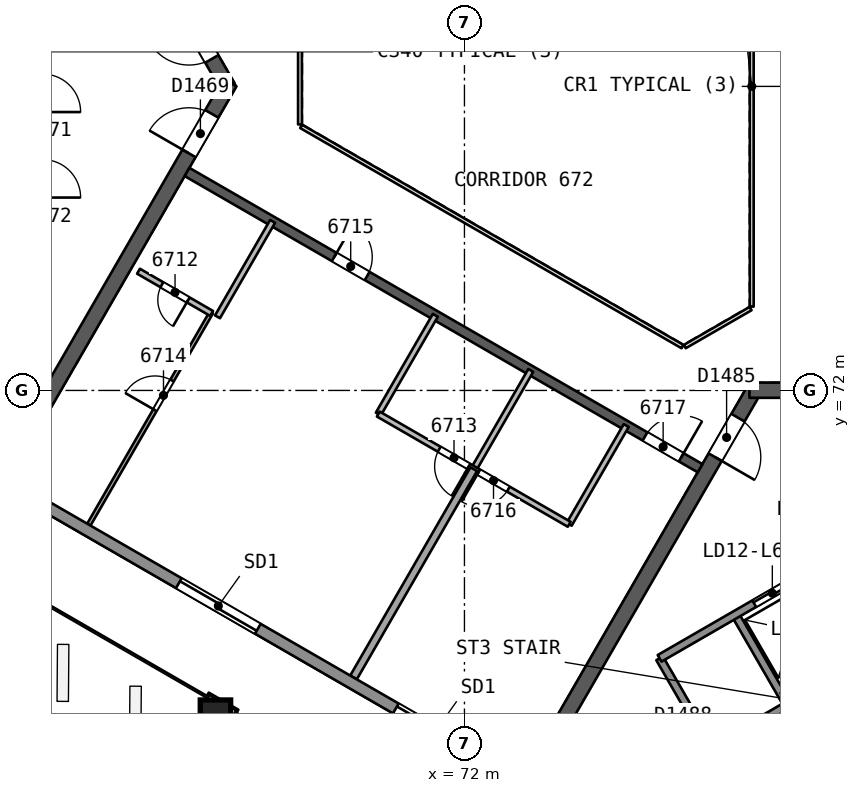
"""IFC4 building model, lengths in metres.
Left out: names, types, materials, properties, quantities, classifications, styles, units other than length and angle.
Written with IfcOpenShell. Run it as: python <this file> out.ifc"""

import sys

from ifc_helpers import new_model, si_unit, direction, frame, frame_2d, origin, origin_2d, place, context, subcontext, project, spatial, rectangle, extrude, element, fill, save


model = new_model("IFC4")
c1 = context("Model", 3, precision=1e-05, world=origin(), true_north=direction((0.0, 1.0)))
c2 = subcontext(c1, "Body", "Model", "MODEL_VIEW")
j1 = project(units=[si_unit("LENGTHUNIT", "METRE"), si_unit("PLANEANGLEUNIT", "RADIAN")], contexts=[c1])
p1 = place(None, origin())
s1 = spatial("IfcSite", under=j1, at=p1, CompositionType="ELEMENT")
p2 = place(p1, origin())
s2 = spatial("IfcBuilding", under=s1, at=p2, CompositionType="ELEMENT")
p3 = place(p2, frame((0.0, 0.0, 273.8)))
s3 = spatial("IfcBuildingStorey", under=s2, at=p3, CompositionType="ELEMENT", Elevation=273.8)
p4 = place(p3, frame((65.769, 80.0, 0.0), z_axis=(0.0, 0.0, 1.0), x_axis=(-0.50000177223, 0.866024380585, 0.0)))
e1 = element("IfcWall", 1, at=p4, inside=s3, PredefinedType="SHEAR", context=c2, shape_type="SweptSolid", body=[
    extrude(rectangle(XDim=10.265, YDim=0.4, at=frame_2d((5.132, 0.0))), origin(), (0.0, 0.0, 1.0), 3.7),
])
p5 = place(p4, frame((0.834, 0.0, 0.0)))
e2 = element("IfcOpeningElement", 2, at=p5, cuts=e1, PredefinedType="OPENING", context=c2, shape_type="SweptSolid", body=[
    extrude(rectangle(XDim=1.2, YDim=2.1, at=frame_2d((0.6, 1.05))), frame((0.0, 0.21, 0.0), z_axis=(0.0, -1.0, 0.0), x_axis=(1.0, 0.0, 0.0)), (0.0, 0.0, 1.0), 0.421),
])
p6 = place(p3, frame((60.737, 71.284, 0.0), z_axis=(0.0, 0.0, 1.0), x_axis=(0.50000547566, 0.866022242388, 0.0)))
e3 = element("IfcWall", 3, at=p6, inside=s3, PredefinedType="SHEAR", context=c2, shape_type="SweptSolid", body=[
    extrude(rectangle(XDim=10.18, YDim=0.4, at=frame_2d((5.09, 0.0))), origin(), (0.0, 0.0, 1.0), 3.7),
])
p7 = place(p6, frame((8.03, 0.0, 0.0)))
e4 = element("IfcOpeningElement", 4, at=p7, cuts=e3, PredefinedType="OPENING", context=c2, shape_type="SweptSolid", body=[
    extrude(rectangle(XDim=1.2, YDim=2.1, at=frame_2d((0.6, 1.05))), frame((0.0, 0.21, 0.0), z_axis=(0.0, -1.0, 0.0), x_axis=(1.0, 0.0, 0.0)), (0.0, 0.0, 1.0), 0.421),
])
p8 = place(p3, frame((79.615, 72.006, 0.0), z_axis=(0.0, 0.0, 1.0), x_axis=(-0.50000177223, -0.866024380585, 0.0)))
e5 = element("IfcWall", 5, at=p8, inside=s3, PredefinedType="SHEAR", context=c2, shape_type="SweptSolid", body=[
    extrude(rectangle(XDim=10.265, YDim=0.4, at=frame_2d((5.132, 0.0))), origin(), (0.0, 0.0, 1.0), 3.7),
])
p9 = place(p8, frame((0.834, 0.0, 0.0)))
e6 = element("IfcOpeningElement", 6, at=p9, cuts=e5, PredefinedType="OPENING", context=c2, shape_type="SweptSolid", body=[
    extrude(rectangle(XDim=1.2, YDim=2.1, at=frame_2d((0.6, 1.05))), frame((0.0, 0.21, 0.0), z_axis=(0.0, -1.0, 0.0), x_axis=(1.0, 0.0, 0.0)), (0.0, 0.0, 1.0), 0.421),
])
p10 = place(p3, frame((89.68, 72.006, 0.0), z_axis=(0.0, 0.0, 1.0), x_axis=(-1.0, 0.0, 0.0)))
e7 = element("IfcWall", 7, at=p10, inside=s3, PredefinedType="SHEAR", context=c2, shape_type="SweptSolid", body=[
    extrude(rectangle(XDim=10.18, YDim=0.4, at=frame_2d((5.09, 0.0))), origin(), (0.0, 0.0, 1.0), 3.7),
])
p11 = place(p10, frame((8.03, 0.0, 0.0)))
e8 = element("IfcOpeningElement", 8, at=p11, cuts=e7, PredefinedType="OPENING", context=c2, shape_type="SweptSolid", body=[
    extrude(rectangle(XDim=1.2, YDim=2.1, at=frame_2d((0.6, 1.05))), frame((0.0, 0.21, 0.0), z_axis=(0.0, -1.0, 0.0), x_axis=(1.0, 0.0, 0.0)), (0.0, 0.0, 1.0), 0.421),
])
p12 = place(p3, frame((64.7, 77.748, 0.0), z_axis=(0.0, 0.0, 1.0), x_axis=(0.866026492143, -0.499998114903, 0.0)))
e9 = element("IfcWall", 9, at=p12, inside=s3, PredefinedType="SHEAR", context=c2, shape_type="SweptSolid", body=[
    extrude(rectangle(XDim=15.588, YDim=0.25, at=frame_2d((7.794, 0.0))), origin(), (0.0, 0.0, 1.0), 3.3),
])
p13 = place(p12, frame((4.473, 0.0, 0.0)))
e10 = element("IfcOpeningElement", 10, at=p13, cuts=e9, PredefinedType="OPENING", context=c2, shape_type="SweptSolid", body=[
    extrude(rectangle(XDim=1.0, YDim=2.1, at=frame_2d((0.5, 1.05))), frame((0.0, 0.135, 0.0), z_axis=(0.0, -1.0, 0.0), x_axis=(1.0, 0.0, 0.0)), (0.0, 0.0, 1.0), 0.271),
])
p14 = place(p12, frame((13.917, 0.0, 0.0)))
e11 = element("IfcOpeningElement", 11, at=p14, cuts=e9, PredefinedType="OPENING", context=c2, shape_type="SweptSolid", body=[
    extrude(rectangle(XDim=1.1, YDim=2.1, at=frame_2d((0.55, 1.05))), frame((0.0, 0.135, 0.0), z_axis=(0.0, -1.0, 0.0), x_axis=(1.0, 0.0, 0.0)), (0.0, 0.0, 1.0), 0.271),
])
p15 = place(p3, frame((65.436, 63.435, 0.0), z_axis=(0.010093620709, 0.017482414954, 0.999796221231), x_axis=(-0.499907122366, -0.865843723195, 0.020187025824)))
e12 = element("IfcColumn", 12, at=p15, inside=s3, PredefinedType="COLUMN", context=c2, shape_type="SweptSolid", body=[
    extrude(rectangle(XDim=0.8, YDim=0.8, at=origin_2d()), origin(), (0.0, 0.0, 1.0), 3.701),
])
p16 = place(p3, frame((62.116, 68.469, 0.0), z_axis=(0.0, 0.0, 1.0), x_axis=(0.499987977232, 0.866032345022, 0.0)))
e13 = element("IfcWall", 13, at=p16, inside=s3, PredefinedType="PARTITIONING", context=c2, shape_type="SweptSolid", body=[
    extrude(rectangle(XDim=6.447, YDim=0.1, at=frame_2d((3.224, 0.0))), origin(), (0.0, 0.0, 1.0), 3.3),
])
p17 = place(p16, frame((3.478, 0.0, 0.0)))
e14 = element("IfcOpeningElement", 14, at=p17, cuts=e13, PredefinedType="OPENING", context=c2, shape_type="SweptSolid", body=[
    extrude(rectangle(XDim=0.9, YDim=2.1, at=frame_2d((0.45, 1.05))), frame((0.0, 0.061, 0.0), z_axis=(0.0, -1.0, 0.0), x_axis=(1.0, 0.0, 0.0)), (0.0, 0.0, 1.0), 0.121),
])
p18 = place(p3, frame((65.347, 74.026, 0.0), z_axis=(0.0, 0.0, 1.0), x_axis=(-0.866042797968, 0.49996987118, 0.0)))
e15 = element("IfcWall", 15, at=p18, inside=s3, PredefinedType="PARTITIONING", context=c2, shape_type="SweptSolid", body=[
    extrude(rectangle(XDim=2.221, YDim=0.15, at=frame_2d((1.11, 0.0))), origin(), (0.0, 0.0, 1.0), 3.3),
])
p19 = place(p18, frame((0.711, 0.0, 0.0)))
e16 = element("IfcOpeningElement", 16, at=p19, cuts=e15, PredefinedType="OPENING", context=c2, shape_type="SweptSolid", body=[
    extrude(rectangle(XDim=0.8, YDim=2.1, at=frame_2d((0.4, 1.05))), frame((0.0, 0.085, 0.0), z_axis=(0.0, -1.0, 0.0), x_axis=(1.0, 0.0, 0.0)), (0.0, 0.0, 1.0), 0.171),
])
p20 = place(p3, frame((66.952, 76.448, 0.0), z_axis=(0.0, 0.0, 1.0), x_axis=(-0.499987231761, -0.866032775405, 0.0)))
e17 = element("IfcWall", 17, at=p20, inside=s3, PredefinedType="PARTITIONING", context=c2, shape_type="SweptSolid", body=[
    extrude(rectangle(XDim=2.9, YDim=0.15, at=frame_2d((1.45, 0.0))), origin(), (0.0, 0.0, 1.0), 3.3),
])
p21 = place(p3, frame((73.745, 72.526, 0.0), z_axis=(0.0, 0.0, 1.0), x_axis=(-0.50002537861, -0.866010750942, 0.0)))
e18 = element("IfcWall", 18, at=p21, inside=s3, PredefinedType="PARTITIONING", context=c2, shape_type="SweptSolid", body=[
    extrude(rectangle(XDim=3.0, YDim=0.15, at=frame_2d((1.5, 0.0))), origin(), (0.0, 0.0, 1.0), 3.3),
])
p22 = place(p3, frame((69.734, 71.378, 0.0), z_axis=(0.0, 0.0, 1.0), x_axis=(0.499990139034, 0.866031096941, 0.0)))
e19 = element("IfcWall", 19, at=p22, inside=s3, PredefinedType="PARTITIONING", context=c2, shape_type="SweptSolid", body=[
    extrude(rectangle(XDim=3.0, YDim=0.15, at=frame_2d((1.5, 0.0))), origin(), (0.0, 0.0, 1.0), 3.3),
])
p23 = place(p3, frame((69.081, 64.447, 0.0), z_axis=(0.0, 0.0, 1.0), x_axis=(0.499997370395, 0.866026921982, 0.0)))
e20 = element("IfcWall", 20, at=p23, inside=s3, PredefinedType="PARTITIONING", context=c2, shape_type="SweptSolid", body=[
    extrude(rectangle(XDim=6.329, YDim=0.2, at=frame_2d((3.165, 0.0))), origin(), (0.0, 0.0, 1.0), 3.3),
])
p24 = place(p3, frame((76.257, 71.076, 0.0), z_axis=(0.0, 0.0, 1.0), x_axis=(-0.499990139034, -0.866031096941, 0.0)))
e21 = element("IfcWall", 21, at=p24, inside=s3, PredefinedType="PARTITIONING", context=c2, shape_type="SweptSolid", body=[
    extrude(rectangle(XDim=3.0, YDim=0.15, at=frame_2d((1.5, 0.0))), origin(), (0.0, 0.0, 1.0), 3.3),
])
p25 = place(p3, frame((74.757, 68.478, 0.0), z_axis=(0.0, 0.0, 1.0), x_axis=(-0.86601454848, 0.500018801468, 0.0)))
e22 = element("IfcWall", 22, at=p25, inside=s3, PredefinedType="PARTITIONING", context=c2, shape_type="SweptSolid", body=[
    extrude(rectangle(XDim=5.8, YDim=0.15, at=frame_2d((2.9, 0.0))), origin(), (0.0, 0.0, 1.0), 3.3),
])
p26 = place(p25, frame((3.05, 0.0, 0.0)))
e23 = element("IfcOpeningElement", 23, at=p26, cuts=e22, PredefinedType="OPENING", context=c2, shape_type="SweptSolid", body=[
    extrude(rectangle(XDim=0.9, YDim=2.1, at=frame_2d((0.45, 1.05))), frame((0.0, 0.085, 0.0), z_axis=(0.0, -1.0, 0.0), x_axis=(1.0, 0.0, 0.0)), (0.0, 0.0, 1.0), 0.171),
])
p27 = place(p25, frame((1.85, 0.0, 0.0)))
e24 = element("IfcOpeningElement", 24, at=p27, cuts=e22, PredefinedType="OPENING", context=c2, shape_type="SweptSolid", body=[
    extrude(rectangle(XDim=0.9, YDim=2.1, at=frame_2d((0.45, 1.05))), frame((0.0, 0.085, 0.0), z_axis=(0.0, -1.0, 0.0), x_axis=(1.0, 0.0, 0.0)), (0.0, 0.0, 1.0), 0.171),
])
p28 = place(p3, frame((87.355, 53.724, 0.0), z_axis=(0.0, 0.0, 1.0), x_axis=(-0.866024153303, 0.50000216589, 0.0)))
e25 = element("IfcWall", 25, at=p28, inside=s3, PredefinedType="SOLIDWALL", context=c2, shape_type="SweptSolid", body=[
    extrude(rectangle(XDim=47.675, YDim=0.3, at=frame_2d((23.837, 0.0))), origin(), (0.0, 0.0, 1.0), 3.3),
])
p29 = place(p28, frame((17.415, 0.0, 0.0)))
e26 = element("IfcOpeningElement", 26, at=p29, cuts=e25, PredefinedType="OPENING", context=c2, shape_type="SweptSolid", body=[
    extrude(rectangle(XDim=2.4, YDim=2.4, at=frame_2d((1.2, 1.2))), frame((0.0, 0.161, 0.0), z_axis=(0.0, -1.0, 0.0), x_axis=(1.0, 0.0, 0.0)), (0.0, 0.0, 1.0), 0.321),
])
p30 = place(p28, frame((37.296, 0.0, 0.0)))
e27 = element("IfcOpeningElement", 27, at=p30, cuts=e25, PredefinedType="OPENING", context=c2, shape_type="SweptSolid", body=[
    extrude(rectangle(XDim=2.4, YDim=2.4, at=frame_2d((1.2, 1.2))), frame((0.0, 0.161, 0.0), z_axis=(0.0, -1.0, 0.0), x_axis=(1.0, 0.0, 0.0)), (0.0, 0.0, 1.0), 0.321),
])
p31 = place(p28, frame((24.008, 0.0, 0.0)))
e28 = element("IfcOpeningElement", 28, at=p31, cuts=e25, PredefinedType="OPENING", context=c2, shape_type="SweptSolid", body=[
    extrude(rectangle(XDim=2.4, YDim=2.4, at=frame_2d((1.2, 1.2))), frame((0.0, 0.161, 0.0), z_axis=(0.0, -1.0, 0.0), x_axis=(1.0, 0.0, 0.0)), (0.0, 0.0, 1.0), 0.321),
])
for number, where, z_axis, x_axis in (
    (29, (77.135, 64.952, 0.0), (0.0, 0.0, 1.0), (0.5, -0.866, 0.0)),
    (30, (79.127, 66.102, 0.0), (0.0, 0.0, 1.0), (0.5, -0.866, 0.0)),
):
    element("IfcWall", number, at=place(p3, frame(where, z_axis=z_axis, x_axis=x_axis)), inside=s3, PredefinedType="SOLIDWALL", context=c2, shape_type="SweptSolid", body=[
        extrude(rectangle(XDim=2.75, YDim=0.2, at=frame_2d((1.375, 0.0))), origin(), (0.0, 0.0, 1.0), 3.3),
    ])
p32 = place(p3, frame((77.135, 64.952, 0.0), z_axis=(0.0, 0.0, 1.0), x_axis=(0.866031916153, 0.499988720078, 0.0)))
e31 = element("IfcWall", 31, at=p32, inside=s3, PredefinedType="SOLIDWALL", context=c2, shape_type="SweptSolid", body=[
    extrude(rectangle(XDim=11.35, YDim=0.2, at=frame_2d((5.675, 0.0))), origin(), (0.0, 0.0, 1.0), 3.3),
])
p33 = place(p32, frame((2.875, 0.0, 0.0)))
e32 = element("IfcOpeningElement", 32, at=p33, cuts=e31, PredefinedType="OPENING", context=c2, shape_type="SweptSolid", body=[
    extrude(rectangle(XDim=1.1, YDim=2.1, at=frame_2d((0.55, 1.05))), frame((0.0, 0.11, 0.0), z_axis=(0.0, -1.0, 0.0), x_axis=(1.0, 0.0, 0.0)), (0.0, 0.0, 1.0), 0.221),
])
p34 = place(p32, frame((5.125, 0.0, 0.0)))
e33 = element("IfcOpeningElement", 33, at=p34, cuts=e31, PredefinedType="OPENING", context=c2, shape_type="SweptSolid", body=[
    extrude(rectangle(XDim=1.1, YDim=2.1, at=frame_2d((0.55, 1.05))), frame((0.0, 0.11, 0.0), z_axis=(0.0, -1.0, 0.0), x_axis=(1.0, 0.0, 0.0)), (0.0, 0.0, 1.0), 0.221),
])
p35 = place(p32, frame((7.375, 0.0, 0.0)))
e34 = element("IfcOpeningElement", 34, at=p35, cuts=e31, PredefinedType="OPENING", context=c2, shape_type="SweptSolid", body=[
    extrude(rectangle(XDim=1.1, YDim=2.1, at=frame_2d((0.55, 1.05))), frame((0.0, 0.11, 0.0), z_axis=(0.0, -1.0, 0.0), x_axis=(1.0, 0.0, 0.0)), (0.0, 0.0, 1.0), 0.221),
])
p36 = place(p3, frame((80.367, 63.954, 0.0), z_axis=(0.0, 0.0, 1.0), x_axis=(0.866026575979, 0.499997969693, 0.0)))
e35 = element("IfcWall", 35, at=p36, inside=s3, PredefinedType="SOLIDWALL", context=c2, shape_type="SweptSolid", body=[
    extrude(rectangle(XDim=6.75, YDim=0.2, at=frame_2d((3.375, 0.0))), origin(), (0.0, 0.0, 1.0), 3.3),
])
p37 = place(p3, frame((78.51, 62.57, 0.0), z_axis=(0.0, 0.0, 1.0), x_axis=(0.866053019151, 0.499952165731, 0.0)))
e36 = element("IfcWall", 36, at=p37, inside=s3, PredefinedType="SOLIDWALL", context=c2, shape_type="SweptSolid", body=[
    extrude(rectangle(XDim=2.3, YDim=0.2, at=frame_2d((1.15, 0.0))), origin(), (0.0, 0.0, 1.0), 3.3),
])
p38 = place(p3, frame((79.56, 74.206, 0.0), z_axis=(0.0, 0.0, 1.0), x_axis=(0.0, 1.0, 0.0)))
e37 = element("IfcWall", 37, at=p38, inside=s3, PredefinedType="PARTITIONING", context=c2, shape_type="SweptSolid", body=[
    extrude(rectangle(XDim=11.588, YDim=0.1, at=frame_2d((5.794, 0.0))), origin(), (0.0, 0.0, 1.0), 3.3),
])
p39 = place(p3, frame((67.672, 81.0, 0.0), z_axis=(0.0, 0.0, 1.0), x_axis=(0.0, -1.0, 0.0)))
e38 = element("IfcWall", 38, at=p39, inside=s3, PredefinedType="PARTITIONING", context=c2, shape_type="SweptSolid", body=[
    extrude(rectangle(XDim=2.0, YDim=0.1, at=frame_2d((1.0, 0.0))), origin(), (0.0, 0.0, 1.0), 3.3),
])
p40 = place(p3, frame((67.702, 78.948, 0.0), z_axis=(0.0, 0.0, 1.0), x_axis=(0.866026658274, -0.499997827154, 0.0)))
e39 = element("IfcWall", 39, at=p40, inside=s3, PredefinedType="PARTITIONING", context=c2, shape_type="SweptSolid", body=[
    extrude(rectangle(XDim=11.588, YDim=0.1, at=frame_2d((5.794, 0.0))), origin(), (0.0, 0.0, 1.0), 3.3),
])
p41 = place(p3, frame((77.798, 73.154, 0.0), z_axis=(0.0, 0.0, 1.0), x_axis=(0.866041268327, 0.499972520799, 0.0)))
e40 = element("IfcWall", 40, at=p41, inside=s3, PredefinedType="PARTITIONING", context=c2, shape_type="SweptSolid", body=[
    extrude(rectangle(XDim=2.0, YDim=0.1, at=frame_2d((1.0, 0.0))), origin(), (0.0, 0.0, 1.0), 3.3),
])
p42 = place(p19, origin())
e41 = element("IfcDoor", 41, at=p42, inside=s3, OperationType="SINGLE_SWING_LEFT", PredefinedType="NOTDEFINED", context=c2, shape_type="SweptSolid", body=[
    extrude(rectangle(XDim=0.8, YDim=2.1, at=frame_2d((0.4, 1.05))), frame((0.0, 0.025, 0.0), z_axis=(0.0, -1.0, 0.0), x_axis=(1.0, 0.0, 0.0)), (0.0, 0.0, 1.0), 0.05),
])
fill(e16, e41)
p43 = place(p26, origin())
e42 = element("IfcDoor", 42, at=p43, inside=s3, OperationType="SINGLE_SWING_LEFT", PredefinedType="NOTDEFINED", context=c2, shape_type="SweptSolid", body=[
    extrude(rectangle(XDim=0.9, YDim=2.1, at=frame_2d((0.45, 1.05))), frame((0.0, 0.025, 0.0), z_axis=(0.0, -1.0, 0.0), x_axis=(1.0, 0.0, 0.0)), (0.0, 0.0, 1.0), 0.05),
])
fill(e23, e42)
p44 = place(p17, origin())
e43 = element("IfcDoor", 43, at=p44, inside=s3, OperationType="SINGLE_SWING_LEFT", PredefinedType="NOTDEFINED", context=c2, shape_type="SweptSolid", body=[
    extrude(rectangle(XDim=0.9, YDim=2.1, at=frame_2d((0.45, 1.05))), frame((0.0, 0.025, 0.0), z_axis=(0.0, -1.0, 0.0), x_axis=(1.0, 0.0, 0.0)), (0.0, 0.0, 1.0), 0.05),
])
fill(e14, e43)
p45 = place(p13, origin())
e44 = element("IfcDoor", 44, at=p45, inside=s3, OperationType="SINGLE_SWING_LEFT", PredefinedType="NOTDEFINED", context=c2, shape_type="SweptSolid", body=[
    extrude(rectangle(XDim=1.0, YDim=2.1, at=frame_2d((0.5, 1.05))), frame((0.0, 0.025, 0.0), z_axis=(0.0, -1.0, 0.0), x_axis=(1.0, 0.0, 0.0)), (0.0, 0.0, 1.0), 0.05),
])
fill(e10, e44)
p46 = place(p27, origin())
e45 = element("IfcDoor", 45, at=p46, inside=s3, OperationType="SINGLE_SWING_RIGHT", PredefinedType="NOTDEFINED", context=c2, shape_type="SweptSolid", body=[
    extrude(rectangle(XDim=0.9, YDim=2.1, at=frame_2d((0.45, 1.05))), frame((0.0, 0.025, 0.0), z_axis=(0.0, -1.0, 0.0), x_axis=(1.0, 0.0, 0.0)), (0.0, 0.0, 1.0), 0.05),
])
fill(e24, e45)
p47 = place(p14, origin())
e46 = element("IfcDoor", 46, at=p47, inside=s3, OperationType="SINGLE_SWING_RIGHT", PredefinedType="NOTDEFINED", context=c2, shape_type="SweptSolid", body=[
    extrude(rectangle(XDim=1.1, YDim=2.1, at=frame_2d((0.55, 1.05))), frame((0.0, 0.025, 0.0), z_axis=(0.0, -1.0, 0.0), x_axis=(1.0, 0.0, 0.0)), (0.0, 0.0, 1.0), 0.05),
])
fill(e11, e46)
p48 = place(p29, origin())
e47 = element("IfcDoor", 47, at=p48, inside=s3, OperationType="SLIDING_TO_LEFT", PredefinedType="NOTDEFINED", context=c2, shape_type="SweptSolid", body=[
    extrude(rectangle(XDim=2.4, YDim=2.4, at=frame_2d((1.2, 1.2))), frame((0.0, 0.025, 0.0), z_axis=(0.0, -1.0, 0.0), x_axis=(1.0, 0.0, 0.0)), (0.0, 0.0, 1.0), 0.05),
])
fill(e26, e47)
p49 = place(p31, origin())
e48 = element("IfcDoor", 48, at=p49, inside=s3, OperationType="SLIDING_TO_LEFT", PredefinedType="NOTDEFINED", context=c2, shape_type="SweptSolid", body=[
    extrude(rectangle(XDim=2.4, YDim=2.4, at=frame_2d((1.2, 1.2))), frame((0.0, 0.025, 0.0), z_axis=(0.0, -1.0, 0.0), x_axis=(1.0, 0.0, 0.0)), (0.0, 0.0, 1.0), 0.05),
])
fill(e28, e48)
p50 = place(p5, origin())
e49 = element("IfcDoor", 49, at=p50, inside=s3, OperationType="SINGLE_SWING_RIGHT", PredefinedType="NOTDEFINED", context=c2, shape_type="SweptSolid", body=[
    extrude(rectangle(XDim=1.2, YDim=2.1, at=frame_2d((0.6, 1.05))), frame((0.0, 0.025, 0.0), z_axis=(0.0, -1.0, 0.0), x_axis=(1.0, 0.0, 0.0)), (0.0, 0.0, 1.0), 0.05),
])
fill(e2, e49)
p51 = place(p7, origin())
e50 = element("IfcDoor", 50, at=p51, inside=s3, OperationType="SINGLE_SWING_LEFT", PredefinedType="NOTDEFINED", context=c2, shape_type="SweptSolid", body=[
    extrude(rectangle(XDim=1.2, YDim=2.1, at=frame_2d((0.6, 1.05))), frame((0.0, 0.025, 0.0), z_axis=(0.0, -1.0, 0.0), x_axis=(1.0, 0.0, 0.0)), (0.0, 0.0, 1.0), 0.05),
])
fill(e4, e50)
p52 = place(p9, origin())
e51 = element("IfcDoor", 51, at=p52, inside=s3, OperationType="SINGLE_SWING_RIGHT", PredefinedType="NOTDEFINED", context=c2, shape_type="SweptSolid", body=[
    extrude(rectangle(XDim=1.2, YDim=2.1, at=frame_2d((0.6, 1.05))), frame((0.0, 0.025, 0.0), z_axis=(0.0, -1.0, 0.0), x_axis=(1.0, 0.0, 0.0)), (0.0, 0.0, 1.0), 0.05),
])
fill(e6, e51)
p53 = place(p33, origin())
e52 = element("IfcDoor", 52, at=p53, inside=s3, OperationType="SLIDING_TO_LEFT", PredefinedType="NOTDEFINED", context=c2, shape_type="SweptSolid", body=[
    extrude(rectangle(XDim=1.1, YDim=2.1, at=frame_2d((0.55, 1.05))), frame((0.0, 0.025, 0.0), z_axis=(0.0, -1.0, 0.0), x_axis=(1.0, 0.0, 0.0)), (0.0, 0.0, 1.0), 0.05),
])
fill(e32, e52)
save(model, sys.argv[1])
